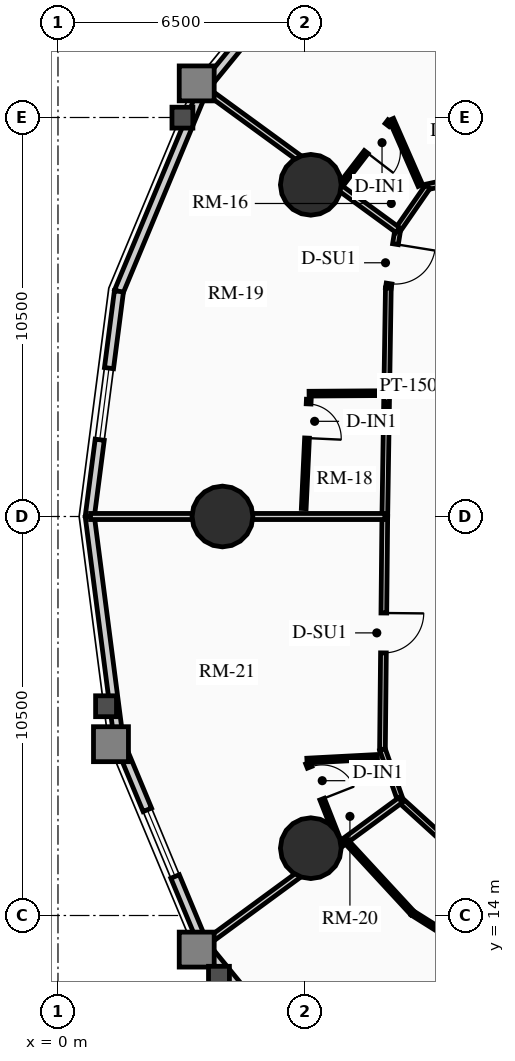
"""IFC4 building model, lengths in metres.
Left out: names, types, materials, properties, quantities, classifications, styles, units other than length and angle.
Written with IfcOpenShell. Run it as: python <this file> out.ifc"""

import sys

from ifc_helpers import new_model, si_unit, direction, frame, frame_2d, origin, origin_2d, place, context, subcontext, project, spatial, rectangle, circle, extrude, source, transform, mapped, element, fill, save


model = new_model("IFC4")
c1 = context("Model", 3, precision=1e-05, world=origin(), true_north=direction((0.0, 1.0)))
c2 = subcontext(c1, "Body", "Model", "MODEL_VIEW")
j1 = project(units=[si_unit("LENGTHUNIT", "METRE"), si_unit("PLANEANGLEUNIT", "RADIAN")], contexts=[c1])
p1 = place(None, origin())
s1 = spatial("IfcSite", under=j1, at=p1, CompositionType="ELEMENT")
p2 = place(p1, origin())
s2 = spatial("IfcBuilding", under=s1, at=p2, CompositionType="ELEMENT")
p3 = place(p2, frame((0.0, 0.0, 48.19)))
s3 = spatial("IfcBuildingStorey", under=s2, at=p3, CompositionType="ELEMENT", Elevation=48.19)
for number, where, z_axis, x_axis in (
    (1, (6.653, 33.229, 0.0), (0.0, 0.0, 1.0), (1.0, 0.0, 0.0)),
    (2, (4.328, 24.5, 0.0), (0.0, 0.0, 1.0), (1.0, 0.0, 0.0)),
    (3, (6.653, 15.771, 0.0), (0.0, 0.0, 1.0), (1.0, 0.0, 0.0)),
):
    element("IfcColumn", number, at=place(p3, frame(where, z_axis=z_axis, x_axis=x_axis)), inside=s3, PredefinedType="USERDEFINED", context=c2, shape_type="SweptSolid", body=[
        extrude(circle(Radius=0.8, at=origin_2d()), origin(), (0.0, 0.0, 1.0), 2.91),
    ])
p4 = place(p3, frame((3.828, 35.768, 0.0), z_axis=(0.0, 0.0, 1.0), x_axis=(0.632713287022, 0.77438614168, 0.0)))
e4 = element("IfcWall", 4, at=p4, inside=s3, PredefinedType="SOLIDWALL", context=c2, shape_type="SweptSolid", body=[
    extrude(rectangle(XDim=5.477, YDim=0.24, at=frame_2d((2.738, 0.0))), origin(), (0.0, 0.0, 1.0), 2.073),
])
m1 = source(origin(), c2, "Body", "SweptSolid", [
    extrude(rectangle(XDim=2.2, YDim=1.35, at=frame_2d((1.1, 0.675))), frame((0.0, 0.13, 0.0), z_axis=(0.0, -1.0, 0.0), x_axis=(1.0, 0.0, 0.0)), (0.0, 0.0, 1.0), 0.26),
])
p5 = place(p4, frame((1.638, 0.0, 0.65)))
e5 = element("IfcOpeningElement", 5, at=p5, cuts=e4, PredefinedType="OPENING", context=c2, shape_type="MappedRepresentation", body=[
    mapped(m1, transform((0.0, 0.0, 0.0), x_axis=(1.0, 0.0, 0.0), y_axis=(0.0, 1.0, 0.0), z_axis=(0.0, 0.0, 1.0), scale=1.0)),
])
p6 = place(p3, frame((1.604, 30.424, 0.0), z_axis=(0.0, 0.0, 1.0), x_axis=(0.384348836956, 0.923187939442, 0.0)))
e6 = element("IfcWall", 6, at=p6, inside=s3, PredefinedType="SOLIDWALL", context=c2, shape_type="SweptSolid", body=[
    extrude(rectangle(XDim=5.789, YDim=0.24, at=frame_2d((2.894, 0.0))), origin(), (0.0, 0.0, 1.0), 2.073),
])
p7 = place(p3, frame((0.837, 24.5, 0.0), z_axis=(0.0, 0.0, 1.0), x_axis=(0.128339641463, 0.991730274031, 0.0)))
e7 = element("IfcWall", 7, at=p7, inside=s3, PredefinedType="SOLIDWALL", context=c2, shape_type="SweptSolid", body=[
    extrude(rectangle(XDim=5.973, YDim=0.24, at=frame_2d((2.987, 0.0))), origin(), (0.0, 0.0, 1.0), 2.073),
])
m2 = source(origin(), c2, "Body", "SweptSolid", [
    extrude(rectangle(XDim=1.9, YDim=1.35, at=frame_2d((0.95, 0.675))), frame((0.0, 0.13, 0.0), z_axis=(0.0, -1.0, 0.0), x_axis=(1.0, 0.0, 0.0)), (0.0, 0.0, 1.0), 0.26),
])
p8 = place(p7, frame((2.037, 0.0, 0.65)))
e8 = element("IfcOpeningElement", 8, at=p8, cuts=e7, PredefinedType="OPENING", context=c2, shape_type="MappedRepresentation", body=[
    mapped(m2, transform((0.0, 0.0, 0.0), x_axis=(1.0, 0.0, 0.0), y_axis=(0.0, 1.0, 0.0), z_axis=(0.0, 0.0, 1.0), scale=1.0)),
])
p9 = place(p3, frame((1.604, 18.576, 0.0), z_axis=(0.0, 0.0, 1.0), x_axis=(-0.128339641463, 0.991730274031, 0.0)))
e9 = element("IfcWall", 9, at=p9, inside=s3, PredefinedType="SOLIDWALL", context=c2, shape_type="SweptSolid", body=[
    extrude(rectangle(XDim=5.973, YDim=0.24, at=frame_2d((2.987, 0.0))), origin(), (0.0, 0.0, 1.0), 2.073),
])
p10 = place(p3, frame((3.828, 13.232, 0.0), z_axis=(0.0, 0.0, 1.0), x_axis=(-0.384348836956, 0.923187939442, 0.0)))
e10 = element("IfcWall", 10, at=p10, inside=s3, PredefinedType="SOLIDWALL", context=c2, shape_type="SweptSolid", body=[
    extrude(rectangle(XDim=5.789, YDim=0.24, at=frame_2d((2.894, 0.0))), origin(), (0.0, 0.0, 1.0), 2.073),
])
p11 = place(p10, frame((1.944, 0.0, 0.65)))
e11 = element("IfcOpeningElement", 11, at=p11, cuts=e10, PredefinedType="OPENING", context=c2, shape_type="MappedRepresentation", body=[
    mapped(m2, transform((0.0, 0.0, 0.0), x_axis=(1.0, 0.0, 0.0), y_axis=(0.0, 1.0, 0.0), z_axis=(0.0, 0.0, 1.0), scale=1.0)),
])
p12 = place(p3, frame((7.293, 8.991, 0.0), z_axis=(0.0, 0.0, 1.0), x_axis=(-0.632713287022, 0.77438614168, 0.0)))
e12 = element("IfcWall", 12, at=p12, inside=s3, PredefinedType="SOLIDWALL", context=c2, shape_type="SweptSolid", body=[
    extrude(rectangle(XDim=5.477, YDim=0.24, at=frame_2d((2.738, 0.0))), origin(), (0.0, 0.0, 1.0), 2.073),
])
p13 = place(p3, frame((11.62, 33.588, 0.0), z_axis=(0.0, 0.0, 1.0), x_axis=(-0.977392314559, -0.211433827571, 0.0)))
e13 = element("IfcWall", 13, at=p13, inside=s3, PredefinedType="PARTITIONING", context=c2, shape_type="SweptSolid", body=[
    extrude(rectangle(XDim=1.934, YDim=0.15, at=frame_2d((0.967, 0.0))), origin(), (0.0, 0.0, 1.0), 2.159),
])
m3 = source(origin(), c2, "Body", "SweptSolid", [
    extrude(rectangle(XDim=1.05, YDim=2.015, at=frame_2d((0.525, 1.007))), frame((0.0, 0.085, 0.0), z_axis=(0.0, -1.0, 0.0), x_axis=(1.0, 0.0, 0.0)), (0.0, 0.0, 1.0), 0.17),
])
p14 = place(p13, frame((0.442, 0.0, 0.0)))
e14 = element("IfcOpeningElement", 14, at=p14, cuts=e13, PredefinedType="OPENING", context=c2, shape_type="MappedRepresentation", body=[
    mapped(m3, transform((0.0, 0.0, 0.0), x_axis=(1.0, 0.0, 0.0), y_axis=(0.0, 1.0, 0.0), z_axis=(0.0, 0.0, 1.0), scale=1.0)),
])
p15 = place(p3, frame((9.729, 33.179, 0.0), z_axis=(0.0, 0.0, 1.0), x_axis=(-0.569155068352, -0.822230203878, 0.0)))
e15 = element("IfcWall", 15, at=p15, inside=s3, PredefinedType="PARTITIONING", context=c2, shape_type="SweptSolid", body=[
    extrude(rectangle(XDim=1.387, YDim=0.15, at=frame_2d((0.694, 0.0))), origin(), (0.0, 0.0, 1.0), 2.159),
])
p16 = place(p3, frame((8.94, 32.038, 0.0), z_axis=(0.0, 0.0, 1.0), x_axis=(-0.159917336462, -0.987130409571, 0.0)))
e16 = element("IfcWall", 16, at=p16, inside=s3, PredefinedType="PARTITIONING", context=c2, shape_type="SweptSolid", body=[
    extrude(rectangle(XDim=1.547, YDim=0.15, at=frame_2d((0.773, 0.0))), origin(), (0.0, 0.0, 1.0), 2.205),
])
p17 = place(p16, frame((0.377, 0.0, 0.0)))
e17 = element("IfcOpeningElement", 17, at=p17, cuts=e16, PredefinedType="OPENING", context=c2, shape_type="MappedRepresentation", body=[
    mapped(m3, transform((0.0, 0.0, 0.0), x_axis=(1.0, 0.0, 0.0), y_axis=(0.0, 1.0, 0.0), z_axis=(0.0, 0.0, 1.0), scale=1.0)),
])
p18 = place(p3, frame((8.693, 30.512, 0.0), z_axis=(0.0, 0.0, 1.0), x_axis=(-0.015389665197, -0.99988157209, 0.0)))
e18 = element("IfcWall", 18, at=p18, inside=s3, PredefinedType="PARTITIONING", context=c2, shape_type="SweptSolid", body=[
    extrude(rectangle(XDim=6.012, YDim=0.15, at=frame_2d((3.006, 0.0))), origin(), (0.0, 0.0, 1.0), 2.635),
])
p19 = place(p3, frame((8.6, 24.5, 0.0), z_axis=(0.0, 0.0, 1.0), x_axis=(-0.010076760723, -0.999949228158, 0.0)))
e19 = element("IfcWall", 19, at=p19, inside=s3, PredefinedType="PARTITIONING", context=c2, shape_type="SweptSolid", body=[
    extrude(rectangle(XDim=6.13, YDim=0.15, at=frame_2d((3.065, 0.0))), origin(), (0.0, 0.0, 1.0), 2.159),
])
p20 = place(p19, frame((2.54, 0.0, 0.0)))
e20 = element("IfcOpeningElement", 20, at=p20, cuts=e19, PredefinedType="OPENING", context=c2, shape_type="MappedRepresentation", body=[
    mapped(m3, transform((0.0, 0.0, 0.0), x_axis=(1.0, 0.0, 0.0), y_axis=(0.0, 1.0, 0.0), z_axis=(0.0, 0.0, 1.0), scale=1.0)),
])
p21 = place(p3, frame((8.538, 18.371, 0.0), z_axis=(0.0, 0.0, 1.0), x_axis=(0.3330273821, -0.942917155837, 0.0)))
e21 = element("IfcWall", 21, at=p21, inside=s3, PredefinedType="PARTITIONING", context=c2, shape_type="SweptSolid", body=[
    extrude(rectangle(XDim=1.417, YDim=0.15, at=frame_2d((0.708, 0.0))), origin(), (0.0, 0.0, 1.0), 2.205),
])
p22 = place(p3, frame((9.01, 17.034, 0.0), z_axis=(0.0, 0.0, 1.0), x_axis=(0.739733009791, -0.672900493554, 0.0)))
e22 = element("IfcWall", 22, at=p22, inside=s3, PredefinedType="PARTITIONING", context=c2, shape_type="SweptSolid", body=[
    extrude(rectangle(XDim=1.494, YDim=0.15, at=frame_2d((0.747, 0.0))), origin(), (0.0, 0.0, 1.0), 2.159),
])
p23 = place(p3, frame((8.94, 32.038, 0.0), z_axis=(0.0, 0.0, 1.0), x_axis=(-0.807831293846, 0.58941377714, 0.0)))
e23 = element("IfcWall", 23, at=p23, inside=s3, PredefinedType="PARTITIONING", context=c2, shape_type="SweptSolid", body=[
    extrude(rectangle(XDim=6.308, YDim=0.16, at=frame_2d((3.154, 0.0))), origin(), (0.0, 0.0, 1.0), 2.073),
])
p24 = place(p3, frame((8.6, 24.5, 0.0), z_axis=(0.0, 0.0, 1.0), x_axis=(-1.0, 0.0, 0.0)))
e24 = element("IfcWall", 24, at=p24, inside=s3, PredefinedType="PARTITIONING", context=c2, shape_type="SweptSolid", body=[
    extrude(rectangle(XDim=7.743, YDim=0.16, at=frame_2d((3.872, 0.0))), origin(), (0.0, 0.0, 1.0), 2.073),
])
p25 = place(p3, frame((9.01, 17.034, 0.0), z_axis=(0.0, 0.0, 1.0), x_axis=(-0.806234156757, -0.591596555499, 0.0)))
e25 = element("IfcWall", 25, at=p25, inside=s3, PredefinedType="PARTITIONING", context=c2, shape_type="SweptSolid", body=[
    extrude(rectangle(XDim=6.407, YDim=0.16, at=frame_2d((3.204, 0.0))), origin(), (0.0, 0.0, 1.0), 2.073),
])
p26 = place(p3, frame((9.535, 33.211, 0.0), z_axis=(0.0, 0.0, 1.0), x_axis=(-0.401687955793, 0.915776602765, 0.0)))
e26 = element("IfcWall", 26, at=p26, inside=s3, PredefinedType="PARTITIONING", context=c2, shape_type="SweptSolid", body=[
    extrude(rectangle(XDim=1.901, YDim=0.125, at=frame_2d((0.95, 0.0))), origin(), (0.0, 0.0, 1.0), 2.635),
])
p27 = place(p3, frame((8.732, 34.899, 0.0), z_axis=(0.0, 0.0, 1.0), x_axis=(-0.609677010074, -0.792649950096, 0.0)))
e27 = element("IfcWall", 27, at=p27, inside=s3, PredefinedType="PARTITIONING", context=c2, shape_type="SweptSolid", body=[
    extrude(rectangle(XDim=2.097, YDim=0.125, at=frame_2d((1.049, 0.0))), origin(), (0.0, 0.0, 1.0), 2.073),
])
m4 = source(origin(), c2, "Body", "SweptSolid", [
    extrude(rectangle(XDim=0.9, YDim=2.005, at=frame_2d((0.45, 1.002))), frame((0.0, 0.073, 0.0), z_axis=(0.0, -1.0, 0.0), x_axis=(1.0, 0.0, 0.0)), (0.0, 0.0, 1.0), 0.145),
])
p28 = place(p27, frame((0.12, 0.0, 0.0)))
e28 = element("IfcOpeningElement", 28, at=p28, cuts=e27, PredefinedType="OPENING", context=c2, shape_type="MappedRepresentation", body=[
    mapped(m4, transform((0.0, 0.0, 0.0), x_axis=(1.0, 0.0, 0.0), y_axis=(0.0, 1.0, 0.0), z_axis=(0.0, 0.0, 1.0), scale=1.0)),
])
p29 = place(p3, frame((8.429, 27.745, 0.0), z_axis=(0.0, 0.0, 1.0), x_axis=(-0.999976632219, -0.006836301373, 0.0)))
e29 = element("IfcWall", 29, at=p29, inside=s3, PredefinedType="PARTITIONING", context=c2, shape_type="SweptSolid", body=[
    extrude(rectangle(XDim=1.821, YDim=0.125, at=frame_2d((0.911, 0.0))), origin(), (0.0, 0.0, 1.0), 2.635),
])
p30 = place(p3, frame((6.6, 27.583, 0.0), z_axis=(0.0, 0.0, 1.0), x_axis=(-0.046516553412, -0.998917519247, 0.0)))
e30 = element("IfcWall", 30, at=p30, inside=s3, PredefinedType="PARTITIONING", context=c2, shape_type="SweptSolid", body=[
    extrude(rectangle(XDim=2.876, YDim=0.125, at=frame_2d((1.438, 0.0))), origin(), (0.0, 0.0, 1.0), 2.635),
])
p31 = place(p30, frame((0.12, 0.0, 0.0)))
e31 = element("IfcOpeningElement", 31, at=p31, cuts=e30, PredefinedType="OPENING", context=c2, shape_type="MappedRepresentation", body=[
    mapped(m4, transform((0.0, 0.0, 0.0), x_axis=(1.0, 0.0, 0.0), y_axis=(0.0, 1.0, 0.0), z_axis=(0.0, 0.0, 1.0), scale=1.0)),
])
p32 = place(p3, frame((8.404, 18.173, 0.0), z_axis=(0.0, 0.0, 1.0), x_axis=(-0.998640999178, -0.052116741655, 0.0)))
e32 = element("IfcWall", 32, at=p32, inside=s3, PredefinedType="PARTITIONING", context=c2, shape_type="SweptSolid", body=[
    extrude(rectangle(XDim=1.855, YDim=0.125, at=frame_2d((0.927, 0.0))), origin(), (0.0, 0.0, 1.0), 2.205),
])
p33 = place(p3, frame((6.577, 18.012, 0.0), z_axis=(0.0, 0.0, 1.0), x_axis=(0.366179258149, -0.930544330433, 0.0)))
e33 = element("IfcWall", 33, at=p33, inside=s3, PredefinedType="PARTITIONING", context=c2, shape_type="SweptSolid", body=[
    extrude(rectangle(XDim=2.208, YDim=0.125, at=frame_2d((1.104, 0.0))), origin(), (0.0, 0.0, 1.0), 2.159),
])
p34 = place(p33, frame((0.12, 0.0, 0.0)))
e34 = element("IfcOpeningElement", 34, at=p34, cuts=e33, PredefinedType="OPENING", context=c2, shape_type="MappedRepresentation", body=[
    mapped(m4, transform((0.0, 0.0, 0.0), x_axis=(1.0, 0.0, 0.0), y_axis=(0.0, 1.0, 0.0), z_axis=(0.0, 0.0, 1.0), scale=1.0)),
])
p35 = place(p3, frame((7.564, 15.973, 0.0), z_axis=(0.0, 0.0, 1.0), x_axis=(0.678576389573, -0.734529838409, 0.0)))
e35 = element("IfcWall", 35, at=p35, inside=s3, PredefinedType="PARTITIONING", context=c2, shape_type="SweptSolid", body=[
    extrude(rectangle(XDim=2.601, YDim=0.125, at=frame_2d((1.3, 0.0))), origin(), (0.0, 0.0, 1.0), 2.635),
])
p36 = place(p3, frame((9.329, 14.063, 0.0), z_axis=(0.0, 0.0, 1.0), x_axis=(0.846882074778, -0.531780736225, 0.0)))
e36 = element("IfcWall", 36, at=p36, inside=s3, PredefinedType="PARTITIONING", context=c2, shape_type="SweptSolid", body=[
    extrude(rectangle(XDim=2.585, YDim=0.125, at=frame_2d((1.292, 0.0))), origin(), (0.0, 0.0, 1.0), 2.205),
])
m5 = source(origin(), c2, "Body", "SweptSolid", [
    extrude(rectangle(XDim=1.9, YDim=1.35, at=frame_2d((0.95, 0.675))), frame((0.0, 0.03, 0.0), z_axis=(0.0, -1.0, 0.0), x_axis=(1.0, 0.0, 0.0)), (0.0, 0.0, 1.0), 0.06),
])
p37 = place(p8, origin())
e37 = element("IfcWindow", 37, at=p37, inside=s3, PartitioningType="DOUBLE_PANEL_VERTICAL", PredefinedType="WINDOW", context=c2, shape_type="MappedRepresentation", body=[
    mapped(m5, transform((0.0, 0.0, 0.0), x_axis=(1.0, 0.0, 0.0), y_axis=(0.0, 1.0, 0.0), z_axis=(0.0, 0.0, 1.0), scale=1.0)),
])
fill(e8, e37)
p38 = place(p11, origin())
e38 = element("IfcWindow", 38, at=p38, inside=s3, PartitioningType="DOUBLE_PANEL_VERTICAL", PredefinedType="WINDOW", context=c2, shape_type="MappedRepresentation", body=[
    mapped(m5, transform((0.0, 0.0, 0.0), x_axis=(1.0, 0.0, 0.0), y_axis=(0.0, 1.0, 0.0), z_axis=(0.0, 0.0, 1.0), scale=1.0)),
])
fill(e11, e38)
m6 = source(origin(), c2, "Body", "SweptSolid", [
    extrude(rectangle(XDim=0.9, YDim=2.005, at=frame_2d((0.45, 1.002))), frame((0.0, 0.025, 0.0), z_axis=(0.0, -1.0, 0.0), x_axis=(1.0, 0.0, 0.0)), (0.0, 0.0, 1.0), 0.05),
])
p39 = place(p28, origin())
e39 = element("IfcDoor", 39, at=p39, inside=s3, OperationType="SINGLE_SWING_RIGHT", PredefinedType="DOOR", context=c2, shape_type="MappedRepresentation", body=[
    mapped(m6, transform((0.0, 0.0, 0.0), x_axis=(1.0, 0.0, 0.0), y_axis=(0.0, 1.0, 0.0), z_axis=(0.0, 0.0, 1.0), scale=1.0)),
])
fill(e28, e39)
m7 = source(origin(), c2, "Body", "SweptSolid", [
    extrude(rectangle(XDim=1.05, YDim=2.015, at=frame_2d((0.525, 1.007))), frame((0.0, 0.025, 0.0), z_axis=(0.0, -1.0, 0.0), x_axis=(1.0, 0.0, 0.0)), (0.0, 0.0, 1.0), 0.05),
])
p40 = place(p17, origin())
e40 = element("IfcDoor", 40, at=p40, inside=s3, OperationType="SINGLE_SWING_LEFT", PredefinedType="DOOR", context=c2, shape_type="MappedRepresentation", body=[
    mapped(m7, transform((0.0, 0.0, 0.0), x_axis=(1.0, 0.0, 0.0), y_axis=(0.0, 1.0, 0.0), z_axis=(0.0, 0.0, 1.0), scale=1.0)),
])
fill(e17, e40)
p41 = place(p31, origin())
e41 = element("IfcDoor", 41, at=p41, inside=s3, OperationType="SINGLE_SWING_RIGHT", PredefinedType="DOOR", context=c2, shape_type="MappedRepresentation", body=[
    mapped(m6, transform((0.0, 0.0, 0.0), x_axis=(1.0, 0.0, 0.0), y_axis=(0.0, 1.0, 0.0), z_axis=(0.0, 0.0, 1.0), scale=1.0)),
])
fill(e31, e41)
p42 = place(p20, origin())
e42 = element("IfcDoor", 42, at=p42, inside=s3, OperationType="SINGLE_SWING_LEFT", PredefinedType="DOOR", context=c2, shape_type="MappedRepresentation", body=[
    mapped(m7, transform((0.0, 0.0, 0.0), x_axis=(1.0, 0.0, 0.0), y_axis=(0.0, 1.0, 0.0), z_axis=(0.0, 0.0, 1.0), scale=1.0)),
])
fill(e20, e42)
p43 = place(p34, origin())
e43 = element("IfcDoor", 43, at=p43, inside=s3, OperationType="SINGLE_SWING_RIGHT", PredefinedType="DOOR", context=c2, shape_type="MappedRepresentation", body=[
    mapped(m6, transform((0.0, 0.0, 0.0), x_axis=(1.0, 0.0, 0.0), y_axis=(0.0, 1.0, 0.0), z_axis=(0.0, 0.0, 1.0), scale=1.0)),
])
fill(e34, e43)
save(model, sys.argv[1])
